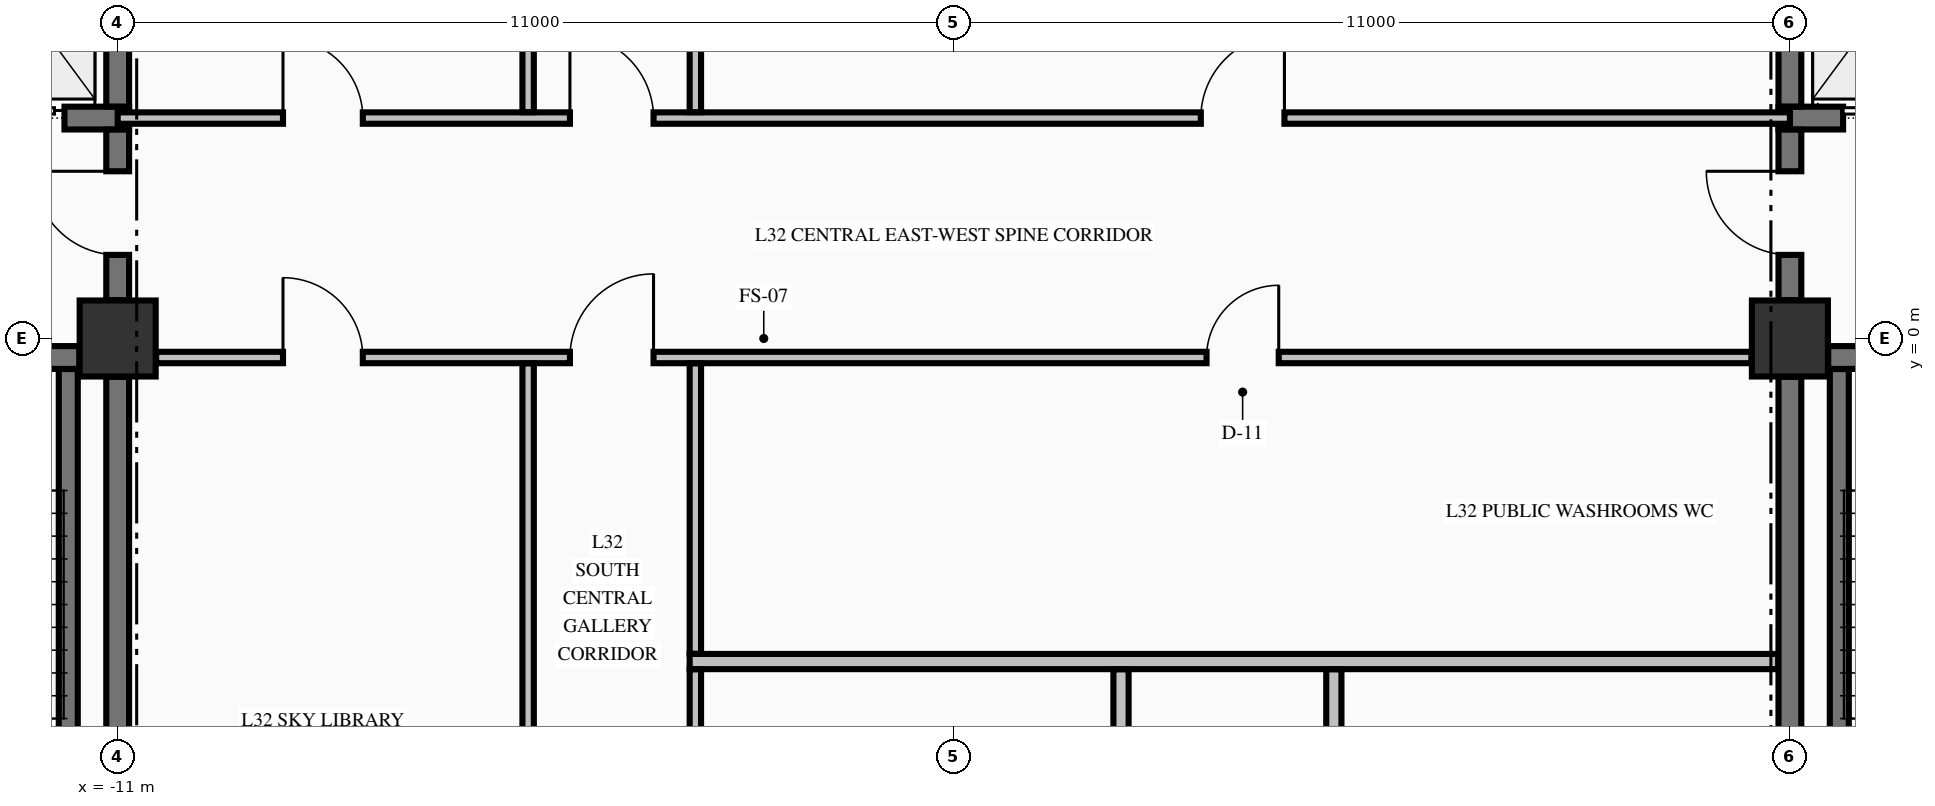
"""IFC4 building model, lengths in metres.
Left out: names, types, materials, properties, quantities, classifications, styles, units other than length and angle.
Written with IfcOpenShell. Run it as: python <this file> out.ifc"""

import sys

from ifc_helpers import new_model, si_unit, direction, frame, frame_2d, origin, origin_2d, place, context, subcontext, project, spatial, rectangle, extrude, element, fill, save


model = new_model("IFC4")
c1 = context("Model", 3, precision=1e-05, world=origin(), true_north=direction((0.0, 1.0)))
c2 = subcontext(c1, "Body", "Model", "MODEL_VIEW")
j1 = project(units=[si_unit("LENGTHUNIT", "METRE"), si_unit("PLANEANGLEUNIT", "RADIAN")], contexts=[c1])
p1 = place(None, origin())
s1 = spatial("IfcSite", under=j1, at=p1, CompositionType="ELEMENT")
p2 = place(p1, origin())
s2 = spatial("IfcBuilding", under=s1, at=p2, CompositionType="ELEMENT")
p3 = place(p2, frame((0.0, 0.0, 128.49)))
s3 = spatial("IfcBuildingStorey", under=s2, at=p3, CompositionType="ELEMENT", Elevation=128.49)
for number, where, z_axis, x_axis in (
    (1, (-11.0, 0.0, -0.25), (0.0, 0.0, 1.0), (1.0, 0.0, 0.0)),
    (2, (11.0, 0.0, -0.25), (0.0, 0.0, 1.0), (1.0, 0.0, 0.0)),
):
    element("IfcColumn", number, at=place(p3, frame(where, z_axis=z_axis, x_axis=x_axis)), inside=s3, PredefinedType="COLUMN", context=c2, shape_type="SweptSolid", body=[
        extrude(rectangle(XDim=1.0, YDim=1.0, at=origin_2d()), origin(), (0.0, 0.0, 1.0), 3.57),
    ])
p4 = place(p3, frame((-19.496, -0.25, 0.0), z_axis=(0.0, 0.0, 1.0), x_axis=(1.0, 0.0, 0.0)))
e3 = element("IfcWall", 3, at=p4, inside=s3, PredefinedType="SHEAR", context=c2, shape_type="SweptSolid", body=[
    extrude(rectangle(XDim=7.992, YDim=0.3, at=frame_2d((3.996, 0.0))), origin(), (0.0, 0.0, 1.0), 3.32),
])
p5 = place(p4, frame((5.796, 0.0, 0.0)))
e4 = element("IfcOpeningElement", 4, at=p5, cuts=e3, PredefinedType="OPENING", context=c2, shape_type="SweptSolid", body=[
    extrude(rectangle(XDim=1.1, YDim=2.15, at=frame_2d((0.55, 1.075))), frame((0.0, 0.16, 0.0), z_axis=(0.0, -1.0, 0.0), x_axis=(1.0, 0.0, 0.0)), (0.0, 0.0, 1.0), 0.32),
])
p6 = place(p3, frame((11.504, -0.25, 0.0), z_axis=(0.0, 0.0, 1.0), x_axis=(1.0, 0.0, 0.0)))
e5 = element("IfcWall", 5, at=p6, inside=s3, PredefinedType="SHEAR", context=c2, shape_type="SweptSolid", body=[
    extrude(rectangle(XDim=3.371, YDim=0.3, at=frame_2d((1.686, 0.0))), origin(), (0.0, 0.0, 1.0), 3.32),
])
p7 = place(p6, frame((1.096, 0.0, 0.0)))
e6 = element("IfcOpeningElement", 6, at=p7, cuts=e5, PredefinedType="OPENING", context=c2, shape_type="SweptSolid", body=[
    extrude(rectangle(XDim=1.1, YDim=2.15, at=frame_2d((0.55, 1.075))), frame((0.0, 0.16, 0.0), z_axis=(0.0, -1.0, 0.0), x_axis=(1.0, 0.0, 0.0)), (0.0, 0.0, 1.0), 0.32),
])
p8 = place(p3, frame((-14.875, 2.9, 0.0), z_axis=(0.0, 0.0, 1.0), x_axis=(1.0, 0.0, 0.0)))
e7 = element("IfcWall", 7, at=p8, inside=s3, PredefinedType="SHEAR", context=c2, shape_type="SweptSolid", body=[
    extrude(rectangle(XDim=4.025, YDim=0.3, at=frame_2d((2.012, 0.0))), origin(), (0.0, 0.0, 1.0), 3.32),
])
p9 = place(p8, frame((2.075, 0.0, 0.0)))
e8 = element("IfcOpeningElement", 8, at=p9, cuts=e7, PredefinedType="OPENING", context=c2, shape_type="SweptSolid", body=[
    extrude(rectangle(XDim=1.1, YDim=2.2, at=frame_2d((0.55, 1.1))), frame((0.0, 0.16, 0.0), z_axis=(0.0, -1.0, 0.0), x_axis=(1.0, 0.0, 0.0)), (0.0, 0.0, 1.0), 0.32),
])
p10 = place(p3, frame((10.85, 2.9, 0.0), z_axis=(0.0, 0.0, 1.0), x_axis=(1.0, 0.0, 0.0)))
e9 = element("IfcWall", 9, at=p10, inside=s3, PredefinedType="SHEAR", context=c2, shape_type="SweptSolid", body=[
    extrude(rectangle(XDim=4.025, YDim=0.3, at=frame_2d((2.012, 0.0))), origin(), (0.0, 0.0, 1.0), 3.32),
])
p11 = place(p10, frame((0.85, 0.0, 0.0)))
e10 = element("IfcOpeningElement", 10, at=p11, cuts=e9, PredefinedType="OPENING", context=c2, shape_type="SweptSolid", body=[
    extrude(rectangle(XDim=1.1, YDim=2.2, at=frame_2d((0.55, 1.1))), frame((0.0, 0.16, 0.0), z_axis=(0.0, -1.0, 0.0), x_axis=(1.0, 0.0, 0.0)), (0.0, 0.0, 1.0), 0.32),
])
p12 = place(p3, frame((-3.475, -4.25, 0.0), z_axis=(0.0, 0.0, 1.0), x_axis=(1.0, 0.0, 0.0)))
e11 = element("IfcWall", 11, at=p12, inside=s3, PredefinedType="PARTITIONING", context=c2, shape_type="SweptSolid", body=[
    extrude(rectangle(XDim=14.322, YDim=0.2, at=frame_2d((7.161, 0.0))), origin(), (0.0, 0.0, 1.0), 3.32),
])
p13 = place(p3, frame((-10.494, -0.25, 0.0), z_axis=(0.0, 0.0, 1.0), x_axis=(1.0, 0.0, 0.0)))
e12 = element("IfcWall", 12, at=p13, inside=s3, PredefinedType="PARTITIONING", context=c2, shape_type="SweptSolid", body=[
    extrude(rectangle(XDim=20.988, YDim=0.15, at=frame_2d((10.494, 0.0))), origin(), (0.0, 0.0, 1.0), 3.32),
])
p14 = place(p13, frame((5.444, 0.0, 0.0)))
e13 = element("IfcOpeningElement", 13, at=p14, cuts=e12, PredefinedType="OPENING", context=c2, shape_type="SweptSolid", body=[
    extrude(rectangle(XDim=1.1, YDim=2.15, at=frame_2d((0.55, 1.075))), frame((0.0, 0.085, 0.0), z_axis=(0.0, -1.0, 0.0), x_axis=(1.0, 0.0, 0.0)), (0.0, 0.0, 1.0), 0.17),
])
p15 = place(p13, frame((1.669, 0.0, 0.0)))
e14 = element("IfcOpeningElement", 14, at=p15, cuts=e12, PredefinedType="OPENING", context=c2, shape_type="SweptSolid", body=[
    extrude(rectangle(XDim=1.05, YDim=2.15, at=frame_2d((0.525, 1.075))), frame((0.0, 0.085, 0.0), z_axis=(0.0, -1.0, 0.0), x_axis=(1.0, 0.0, 0.0)), (0.0, 0.0, 1.0), 0.17),
])
p16 = place(p13, frame((13.819, 0.0, 0.0)))
e15 = element("IfcOpeningElement", 15, at=p16, cuts=e12, PredefinedType="OPENING", context=c2, shape_type="SweptSolid", body=[
    extrude(rectangle(XDim=0.95, YDim=2.15, at=frame_2d((0.475, 1.075))), frame((0.0, 0.085, 0.0), z_axis=(0.0, -1.0, 0.0), x_axis=(1.0, 0.0, 0.0)), (0.0, 0.0, 1.0), 0.17),
])
p17 = place(p3, frame((-11.0, 2.9, 0.0), z_axis=(0.0, 0.0, 1.0), x_axis=(1.0, 0.0, 0.0)))
e16 = element("IfcWall", 16, at=p17, inside=s3, PredefinedType="PARTITIONING", context=c2, shape_type="SweptSolid", body=[
    extrude(rectangle(XDim=22.0, YDim=0.15, at=frame_2d((11.0, 0.0))), origin(), (0.0, 0.0, 1.0), 3.32),
])
p18 = place(p17, frame((5.95, 0.0, 0.0)))
e17 = element("IfcOpeningElement", 17, at=p18, cuts=e16, PredefinedType="OPENING", context=c2, shape_type="SweptSolid", body=[
    extrude(rectangle(XDim=1.1, YDim=2.15, at=frame_2d((0.55, 1.075))), frame((0.0, 0.085, 0.0), z_axis=(0.0, -1.0, 0.0), x_axis=(1.0, 0.0, 0.0)), (0.0, 0.0, 1.0), 0.17),
])
p19 = place(p17, frame((2.175, 0.0, 0.0)))
e18 = element("IfcOpeningElement", 18, at=p19, cuts=e16, PredefinedType="OPENING", context=c2, shape_type="SweptSolid", body=[
    extrude(rectangle(XDim=1.05, YDim=2.15, at=frame_2d((0.525, 1.075))), frame((0.0, 0.085, 0.0), z_axis=(0.0, -1.0, 0.0), x_axis=(1.0, 0.0, 0.0)), (0.0, 0.0, 1.0), 0.17),
])
p20 = place(p17, frame((14.25, 0.0, 0.0)))
e19 = element("IfcOpeningElement", 19, at=p20, cuts=e16, PredefinedType="OPENING", context=c2, shape_type="SweptSolid", body=[
    extrude(rectangle(XDim=1.1, YDim=2.15, at=frame_2d((0.55, 1.075))), frame((0.0, 0.085, 0.0), z_axis=(0.0, -1.0, 0.0), x_axis=(1.0, 0.0, 0.0)), (0.0, 0.0, 1.0), 0.17),
])
p21 = place(p3, frame((-11.65, -9.798, 0.0), z_axis=(0.0, 0.0, 1.0), x_axis=(0.0, 1.0, 0.0)))
e20 = element("IfcWall", 20, at=p21, inside=s3, PredefinedType="SOLIDWALL", context=c2, shape_type="SweptSolid", body=[
    extrude(rectangle(XDim=9.396, YDim=0.25, at=frame_2d((4.698, 0.0))), origin(), (0.0, 0.0, 1.0), 3.32),
])
p22 = place(p3, frame((-11.0, -9.446, 0.0), z_axis=(0.0, 0.0, 1.0), x_axis=(0.0, 1.0, 0.0)))
e21 = element("IfcWall", 21, at=p22, inside=s3, PredefinedType="SHEAR", context=c2, shape_type="SweptSolid", body=[
    extrude(rectangle(XDim=8.942, YDim=0.3, at=frame_2d((4.471, 0.0))), origin(), (0.0, 0.0, 1.0), 3.32),
])
p23 = place(p3, frame((-11.0, 0.504, 0.0), z_axis=(0.0, 0.0, 1.0), x_axis=(0.0, 1.0, 0.0)))
e22 = element("IfcWall", 22, at=p23, inside=s3, PredefinedType="SHEAR", context=c2, shape_type="SweptSolid", body=[
    extrude(rectangle(XDim=2.244, YDim=0.3, at=frame_2d((1.122, 0.0))), origin(), (0.0, 0.0, 1.0), 3.32),
])
p24 = place(p23, frame((0.596, 0.0, 0.0)))
e23 = element("IfcOpeningElement", 23, at=p24, cuts=e22, PredefinedType="OPENING", context=c2, shape_type="SweptSolid", body=[
    extrude(rectangle(XDim=1.1, YDim=2.15, at=frame_2d((0.55, 1.075))), frame((0.0, 0.16, 0.0), z_axis=(0.0, -1.0, 0.0), x_axis=(1.0, 0.0, 0.0)), (0.0, 0.0, 1.0), 0.32),
])
p25 = place(p3, frame((-11.0, 3.052, 0.0), z_axis=(0.0, 0.0, 1.0), x_axis=(0.0, 1.0, 0.0)))
e24 = element("IfcWall", 24, at=p25, inside=s3, PredefinedType="SHEAR", context=c2, shape_type="SweptSolid", body=[
    extrude(rectangle(XDim=2.496, YDim=0.3, at=frame_2d((1.248, 0.0))), origin(), (0.0, 0.0, 1.0), 3.32),
])
p26 = place(p3, frame((11.0, -9.446, 0.0), z_axis=(0.0, 0.0, 1.0), x_axis=(0.0, 1.0, 0.0)))
e25 = element("IfcWall", 25, at=p26, inside=s3, PredefinedType="SHEAR", context=c2, shape_type="SweptSolid", body=[
    extrude(rectangle(XDim=8.942, YDim=0.3, at=frame_2d((4.471, 0.0))), origin(), (0.0, 0.0, 1.0), 3.32),
])
p27 = place(p3, frame((11.0, 0.504, 0.0), z_axis=(0.0, 0.0, 1.0), x_axis=(0.0, 1.0, 0.0)))
e26 = element("IfcWall", 26, at=p27, inside=s3, PredefinedType="SHEAR", context=c2, shape_type="SweptSolid", body=[
    extrude(rectangle(XDim=2.244, YDim=0.3, at=frame_2d((1.122, 0.0))), origin(), (0.0, 0.0, 1.0), 3.32),
])
p28 = place(p27, frame((0.596, 0.0, 0.0)))
e27 = element("IfcOpeningElement", 27, at=p28, cuts=e26, PredefinedType="OPENING", context=c2, shape_type="SweptSolid", body=[
    extrude(rectangle(XDim=1.1, YDim=2.15, at=frame_2d((0.55, 1.075))), frame((0.0, 0.16, 0.0), z_axis=(0.0, -1.0, 0.0), x_axis=(1.0, 0.0, 0.0)), (0.0, 0.0, 1.0), 0.32),
])
p29 = place(p3, frame((11.0, 3.052, 0.0), z_axis=(0.0, 0.0, 1.0), x_axis=(0.0, 1.0, 0.0)))
e28 = element("IfcWall", 28, at=p29, inside=s3, PredefinedType="SHEAR", context=c2, shape_type="SweptSolid", body=[
    extrude(rectangle(XDim=2.496, YDim=0.3, at=frame_2d((1.248, 0.0))), origin(), (0.0, 0.0, 1.0), 3.32),
])
p30 = place(p3, frame((11.65, -9.798, 0.0), z_axis=(0.0, 0.0, 1.0), x_axis=(0.0, 1.0, 0.0)))
e29 = element("IfcWall", 29, at=p30, inside=s3, PredefinedType="SOLIDWALL", context=c2, shape_type="SweptSolid", body=[
    extrude(rectangle(XDim=9.396, YDim=0.25, at=frame_2d((4.698, 0.0))), origin(), (0.0, 0.0, 1.0), 3.32),
])
p31 = place(p3, frame((-5.6, -9.872, 0.0), z_axis=(0.0, 0.0, 1.0), x_axis=(0.0, 1.0, 0.0)))
e30 = element("IfcWall", 30, at=p31, inside=s3, PredefinedType="PARTITIONING", context=c2, shape_type="SweptSolid", body=[
    extrude(rectangle(XDim=9.544, YDim=0.15, at=frame_2d((4.772, 0.0))), origin(), (0.0, 0.0, 1.0), 3.32),
])
p32 = place(p3, frame((-5.6, 2.978, 0.0), z_axis=(0.0, 0.0, 1.0), x_axis=(0.0, 1.0, 0.0)))
e31 = element("IfcWall", 31, at=p32, inside=s3, PredefinedType="PARTITIONING", context=c2, shape_type="SweptSolid", body=[
    extrude(rectangle(XDim=7.444, YDim=0.15, at=frame_2d((3.722, 0.0))), origin(), (0.0, 0.0, 1.0), 3.32),
])
p33 = place(p3, frame((-3.4, -9.872, 0.0), z_axis=(0.0, 0.0, 1.0), x_axis=(0.0, 1.0, 0.0)))
e32 = element("IfcWall", 32, at=p33, inside=s3, PredefinedType="PARTITIONING", context=c2, shape_type="SweptSolid", body=[
    extrude(rectangle(XDim=5.519, YDim=0.15, at=frame_2d((2.76, 0.0))), origin(), (0.0, 0.0, 1.0), 3.32),
])
p34 = place(p33, frame((2.597, 0.0, 0.0)))
e33 = element("IfcOpeningElement", 33, at=p34, cuts=e32, PredefinedType="OPENING", context=c2, shape_type="SweptSolid", body=[
    extrude(rectangle(XDim=0.95, YDim=2.15, at=frame_2d((0.475, 1.075))), frame((0.0, 0.085, 0.0), z_axis=(0.0, -1.0, 0.0), x_axis=(1.0, 0.0, 0.0)), (0.0, 0.0, 1.0), 0.17),
])
p35 = place(p3, frame((-3.4, -4.147, 0.0), z_axis=(0.0, 0.0, 1.0), x_axis=(0.0, 1.0, 0.0)))
e34 = element("IfcWall", 34, at=p35, inside=s3, PredefinedType="PARTITIONING", context=c2, shape_type="SweptSolid", body=[
    extrude(rectangle(XDim=3.819, YDim=0.15, at=frame_2d((1.91, 0.0))), origin(), (0.0, 0.0, 1.0), 3.32),
])
p36 = place(p3, frame((-3.4, 2.978, 0.0), z_axis=(0.0, 0.0, 1.0), x_axis=(0.0, 1.0, 0.0)))
e35 = element("IfcWall", 35, at=p36, inside=s3, PredefinedType="PARTITIONING", context=c2, shape_type="SweptSolid", body=[
    extrude(rectangle(XDim=7.444, YDim=0.15, at=frame_2d((3.722, 0.0))), origin(), (0.0, 0.0, 1.0), 3.32),
])
for number, where, z_axis, x_axis in (
    (36, (2.2, -9.872, 0.0), (0.0, 0.0, 1.0), (0.0, 1.0, 0.0)),
    (37, (5.0, -9.872, 0.0), (0.0, 0.0, 1.0), (0.0, 1.0, 0.0)),
):
    element("IfcWall", number, at=place(p3, frame(where, z_axis=z_axis, x_axis=x_axis)), inside=s3, PredefinedType="PARTITIONING", context=c2, shape_type="SweptSolid", body=[
        extrude(rectangle(XDim=5.519, YDim=0.2, at=frame_2d((2.76, 0.0))), origin(), (0.0, 0.0, 1.0), 3.32),
    ])
p37 = place(p24, origin())
e38 = element("IfcDoor", 38, at=p37, inside=s3, OperationType="SINGLE_SWING_RIGHT", PredefinedType="DOOR", context=c2, shape_type="SweptSolid", body=[
    extrude(rectangle(XDim=1.1, YDim=2.15, at=frame_2d((0.55, 1.075))), frame((0.0, 0.025, 0.0), z_axis=(0.0, -1.0, 0.0), x_axis=(1.0, 0.0, 0.0)), (0.0, 0.0, 1.0), 0.05),
])
fill(e23, e38)
p38 = place(p9, origin())
e39 = element("IfcDoor", 39, at=p38, inside=s3, OperationType="SLIDING_TO_LEFT", PredefinedType="DOOR", context=c2, shape_type="SweptSolid", body=[
    extrude(rectangle(XDim=1.1, YDim=2.2, at=frame_2d((0.55, 1.1))), frame((0.0, 0.025, 0.0), z_axis=(0.0, -1.0, 0.0), x_axis=(1.0, 0.0, 0.0)), (0.0, 0.0, 1.0), 0.05),
])
fill(e8, e39)
p39 = place(p28, origin())
e40 = element("IfcDoor", 40, at=p39, inside=s3, OperationType="SINGLE_SWING_RIGHT", PredefinedType="DOOR", context=c2, shape_type="SweptSolid", body=[
    extrude(rectangle(XDim=1.1, YDim=2.15, at=frame_2d((0.55, 1.075))), frame((0.0, 0.025, 0.0), z_axis=(0.0, -1.0, 0.0), x_axis=(1.0, 0.0, 0.0)), (0.0, 0.0, 1.0), 0.05),
])
fill(e27, e40)
p40 = place(p11, origin())
e41 = element("IfcDoor", 41, at=p40, inside=s3, OperationType="SLIDING_TO_RIGHT", PredefinedType="DOOR", context=c2, shape_type="SweptSolid", body=[
    extrude(rectangle(XDim=1.1, YDim=2.2, at=frame_2d((0.55, 1.1))), frame((0.0, 0.025, 0.0), z_axis=(0.0, -1.0, 0.0), x_axis=(1.0, 0.0, 0.0)), (0.0, 0.0, 1.0), 0.05),
])
fill(e10, e41)
p41 = place(p18, origin())
e42 = element("IfcDoor", 42, at=p41, inside=s3, OperationType="SINGLE_SWING_LEFT", PredefinedType="DOOR", context=c2, shape_type="SweptSolid", body=[
    extrude(rectangle(XDim=1.1, YDim=2.15, at=frame_2d((0.55, 1.075))), frame((0.0, 0.025, 0.0), z_axis=(0.0, -1.0, 0.0), x_axis=(1.0, 0.0, 0.0)), (0.0, 0.0, 1.0), 0.05),
])
fill(e17, e42)
p42 = place(p14, origin())
e43 = element("IfcDoor", 43, at=p42, inside=s3, OperationType="SINGLE_SWING_RIGHT", PredefinedType="DOOR", context=c2, shape_type="SweptSolid", body=[
    extrude(rectangle(XDim=1.1, YDim=2.15, at=frame_2d((0.55, 1.075))), frame((0.0, 0.025, 0.0), z_axis=(0.0, -1.0, 0.0), x_axis=(1.0, 0.0, 0.0)), (0.0, 0.0, 1.0), 0.05),
])
fill(e13, e43)
p43 = place(p19, origin())
e44 = element("IfcDoor", 44, at=p43, inside=s3, OperationType="SINGLE_SWING_LEFT", PredefinedType="DOOR", context=c2, shape_type="SweptSolid", body=[
    extrude(rectangle(XDim=1.05, YDim=2.15, at=frame_2d((0.525, 1.075))), frame((0.0, 0.025, 0.0), z_axis=(0.0, -1.0, 0.0), x_axis=(1.0, 0.0, 0.0)), (0.0, 0.0, 1.0), 0.05),
])
fill(e18, e44)
p44 = place(p20, origin())
e45 = element("IfcDoor", 45, at=p44, inside=s3, OperationType="SINGLE_SWING_RIGHT", PredefinedType="DOOR", context=c2, shape_type="SweptSolid", body=[
    extrude(rectangle(XDim=1.1, YDim=2.15, at=frame_2d((0.55, 1.075))), frame((0.0, 0.025, 0.0), z_axis=(0.0, -1.0, 0.0), x_axis=(1.0, 0.0, 0.0)), (0.0, 0.0, 1.0), 0.05),
])
fill(e19, e45)
p45 = place(p15, origin())
e46 = element("IfcDoor", 46, at=p45, inside=s3, OperationType="SINGLE_SWING_LEFT", PredefinedType="DOOR", context=c2, shape_type="SweptSolid", body=[
    extrude(rectangle(XDim=1.05, YDim=2.15, at=frame_2d((0.525, 1.075))), frame((0.0, 0.025, 0.0), z_axis=(0.0, -1.0, 0.0), x_axis=(1.0, 0.0, 0.0)), (0.0, 0.0, 1.0), 0.05),
])
fill(e14, e46)
p46 = place(p16, origin())
e47 = element("IfcDoor", 47, at=p46, inside=s3, OperationType="SINGLE_SWING_RIGHT", PredefinedType="DOOR", context=c2, shape_type="SweptSolid", body=[
    extrude(rectangle(XDim=0.95, YDim=2.15, at=frame_2d((0.475, 1.075))), frame((0.0, 0.025, 0.0), z_axis=(0.0, -1.0, 0.0), x_axis=(1.0, 0.0, 0.0)), (0.0, 0.0, 1.0), 0.05),
])
fill(e15, e47)
save(model, sys.argv[1])
